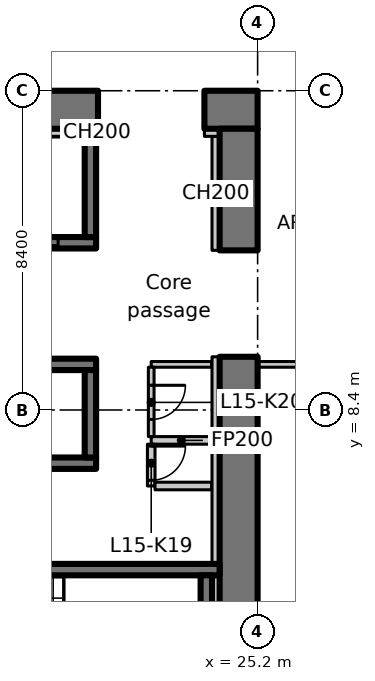
"""IFC4 building model, lengths in metres.
Left out: names, types, materials, properties, quantities, classifications, styles, units other than length and angle.
Written with IfcOpenShell. Run it as: python <this file> out.ifc"""

import sys

from ifc_helpers import new_model, si_unit, direction, frame, frame_2d, origin, place, context, subcontext, project, spatial, rectangle, extrude, element, fill, save


model = new_model("IFC4")
c1 = context("Model", 3, precision=1e-05, world=origin(), true_north=direction((0.0, 1.0)))
c2 = subcontext(c1, "Body", "Model", "MODEL_VIEW")
j1 = project(units=[si_unit("LENGTHUNIT", "METRE"), si_unit("PLANEANGLEUNIT", "RADIAN")], contexts=[c1])
p1 = place(None, origin())
s1 = spatial("IfcSite", under=j1, at=p1, CompositionType="ELEMENT")
p2 = place(p1, origin())
s2 = spatial("IfcBuilding", under=s1, at=p2, CompositionType="ELEMENT")
p3 = place(p2, frame((0.0, 0.0, 68.9)))
s3 = spatial("IfcBuildingStorey", under=s2, at=p3, CompositionType="ELEMENT", Elevation=68.9)
p4 = place(p3, frame((-1.1, 16.3, 0.0), z_axis=(0.0, 0.0, 1.0), x_axis=(1.0, 0.0, 0.0)))
e1 = element("IfcWall", 1, at=p4, inside=s3, PredefinedType="SHEAR", context=c2, shape_type="SweptSolid", body=[
    extrude(rectangle(XDim=22.1, YDim=1.0, at=frame_2d((11.05, 0.0))), origin(), (0.0, 0.0, 1.0), 3.35),
])
p5 = place(p4, frame((3.15, 0.0, 0.0)))
e2 = element("IfcOpeningElement", 2, at=p5, cuts=e1, PredefinedType="OPENING", context=c2, shape_type="SweptSolid", body=[
    extrude(rectangle(XDim=1.1, YDim=2.3, at=frame_2d((0.55, 1.15))), frame((0.0, 0.51, 0.0), z_axis=(0.0, -1.0, 0.0), x_axis=(1.0, 0.0, 0.0)), (0.0, 0.0, 1.0), 1.02),
])
p6 = place(p3, frame((23.8, 16.3, 0.0), z_axis=(0.0, 0.0, 1.0), x_axis=(1.0, 0.0, 0.0)))
e3 = element("IfcWall", 3, at=p6, inside=s3, PredefinedType="SHEAR", context=c2, shape_type="SweptSolid", body=[
    extrude(rectangle(XDim=1.4, YDim=1.0, at=frame_2d((0.7, 0.0))), origin(), (0.0, 0.0, 1.0), 3.35),
])
p7 = place(p3, frame((24.7, 1.0, 0.0), z_axis=(0.0, 0.0, 1.0), x_axis=(0.0, 1.0, 0.0)))
e4 = element("IfcWall", 4, at=p7, inside=s3, PredefinedType="SHEAR", context=c2, shape_type="SweptSolid", body=[
    extrude(rectangle(XDim=8.8, YDim=1.0, at=frame_2d((4.4, 0.0))), origin(), (0.0, 0.0, 1.0), 3.35),
])
p8 = place(p3, frame((24.7, 12.6, 0.0), z_axis=(0.0, 0.0, 1.0), x_axis=(0.0, 1.0, 0.0)))
e5 = element("IfcWall", 5, at=p8, inside=s3, PredefinedType="SHEAR", context=c2, shape_type="SweptSolid", body=[
    extrude(rectangle(XDim=3.2, YDim=1.0, at=frame_2d((1.6, 0.0))), origin(), (0.0, 0.0, 1.0), 3.35),
])
p9 = place(p3, frame((24.1, 12.6, 0.0), z_axis=(0.0, 0.0, 1.0), x_axis=(0.0, 1.0, 0.0)))
e6 = element("IfcWall", 6, at=p9, inside=s3, PredefinedType="PARTITIONING", context=c2, shape_type="SweptSolid", body=[
    extrude(rectangle(XDim=3.0, YDim=0.2, at=frame_2d((1.5, 0.0))), origin(), (0.0, 0.0, 1.0), 3.35),
])
p10 = place(p3, frame((23.8, 15.7, 0.0), z_axis=(0.0, 0.0, 1.0), x_axis=(1.0, 0.0, 0.0)))
e7 = element("IfcWall", 7, at=p10, inside=s3, PredefinedType="PARTITIONING", context=c2, shape_type="SweptSolid", body=[
    extrude(rectangle(XDim=0.4, YDim=0.2, at=frame_2d((0.2, 0.0))), origin(), (0.0, 0.0, 1.0), 3.35),
])
p11 = place(p3, frame((1.0, 7.0, 0.0), z_axis=(0.0, 0.0, 1.0), x_axis=(1.0, 0.0, 0.0)))
e8 = element("IfcWall", 8, at=p11, inside=s3, PredefinedType="SHEAR", context=c2, shape_type="SweptSolid", body=[
    extrude(rectangle(XDim=19.95, YDim=0.3, at=frame_2d((9.975, 0.0))), origin(), (0.0, 0.0, 1.0), 3.35),
])
p12 = place(p3, frame((1.0, 9.6, 0.0), z_axis=(0.0, 0.0, 1.0), x_axis=(1.0, 0.0, 0.0)))
e9 = element("IfcWall", 9, at=p12, inside=s3, PredefinedType="SHEAR", context=c2, shape_type="SweptSolid", body=[
    extrude(rectangle(XDim=19.95, YDim=0.3, at=frame_2d((9.975, 0.0))), origin(), (0.0, 0.0, 1.0), 3.35),
])
p13 = place(p12, frame((1.05, 0.0, 0.0)))
e10 = element("IfcOpeningElement", 10, at=p13, cuts=e9, PredefinedType="OPENING", context=c2, shape_type="SweptSolid", body=[
    extrude(rectangle(XDim=1.1, YDim=2.3, at=frame_2d((0.55, 1.15))), frame((0.0, 0.16, 0.0), z_axis=(0.0, -1.0, 0.0), x_axis=(1.0, 0.0, 0.0)), (0.0, 0.0, 1.0), 0.32),
])
p14 = place(p12, frame((3.85, 0.0, 0.0)))
e11 = element("IfcOpeningElement", 11, at=p14, cuts=e9, PredefinedType="OPENING", context=c2, shape_type="SweptSolid", body=[
    extrude(rectangle(XDim=1.1, YDim=2.3, at=frame_2d((0.55, 1.15))), frame((0.0, 0.16, 0.0), z_axis=(0.0, -1.0, 0.0), x_axis=(1.0, 0.0, 0.0)), (0.0, 0.0, 1.0), 0.32),
])
p15 = place(p12, frame((6.65, 0.0, 0.0)))
e12 = element("IfcOpeningElement", 12, at=p15, cuts=e9, PredefinedType="OPENING", context=c2, shape_type="SweptSolid", body=[
    extrude(rectangle(XDim=1.1, YDim=2.3, at=frame_2d((0.55, 1.15))), frame((0.0, 0.16, 0.0), z_axis=(0.0, -1.0, 0.0), x_axis=(1.0, 0.0, 0.0)), (0.0, 0.0, 1.0), 0.32),
])
p16 = place(p12, frame((9.45, 0.0, 0.0)))
e13 = element("IfcOpeningElement", 13, at=p16, cuts=e9, PredefinedType="OPENING", context=c2, shape_type="SweptSolid", body=[
    extrude(rectangle(XDim=1.1, YDim=2.3, at=frame_2d((0.55, 1.15))), frame((0.0, 0.16, 0.0), z_axis=(0.0, -1.0, 0.0), x_axis=(1.0, 0.0, 0.0)), (0.0, 0.0, 1.0), 0.32),
])
p17 = place(p12, frame((12.25, 0.0, 0.0)))
e14 = element("IfcOpeningElement", 14, at=p17, cuts=e9, PredefinedType="OPENING", context=c2, shape_type="SweptSolid", body=[
    extrude(rectangle(XDim=1.1, YDim=2.3, at=frame_2d((0.55, 1.15))), frame((0.0, 0.16, 0.0), z_axis=(0.0, -1.0, 0.0), x_axis=(1.0, 0.0, 0.0)), (0.0, 0.0, 1.0), 0.32),
])
p18 = place(p12, frame((15.05, 0.0, 0.0)))
e15 = element("IfcOpeningElement", 15, at=p18, cuts=e9, PredefinedType="OPENING", context=c2, shape_type="SweptSolid", body=[
    extrude(rectangle(XDim=1.1, YDim=2.3, at=frame_2d((0.55, 1.15))), frame((0.0, 0.16, 0.0), z_axis=(0.0, -1.0, 0.0), x_axis=(1.0, 0.0, 0.0)), (0.0, 0.0, 1.0), 0.32),
])
p19 = place(p3, frame((20.8, 7.15, 0.0), z_axis=(0.0, 0.0, 1.0), x_axis=(0.0, 1.0, 0.0)))
e16 = element("IfcWall", 16, at=p19, inside=s3, PredefinedType="SHEAR", context=c2, shape_type="SweptSolid", body=[
    extrude(rectangle(XDim=2.3, YDim=0.3, at=frame_2d((1.15, 0.0))), origin(), (0.0, 0.0, 1.0), 3.35),
])
p20 = place(p3, frame((15.05, 12.8, 0.0), z_axis=(0.0, 0.0, 1.0), x_axis=(1.0, 0.0, 0.0)))
e17 = element("IfcWall", 17, at=p20, inside=s3, PredefinedType="SHEAR", context=c2, shape_type="SweptSolid", body=[
    extrude(rectangle(XDim=5.9, YDim=0.3, at=frame_2d((2.95, 0.0))), origin(), (0.0, 0.0, 1.0), 3.35),
])
p21 = place(p20, frame((3.8, 0.0, 0.0)))
e18 = element("IfcOpeningElement", 18, at=p21, cuts=e17, PredefinedType="OPENING", context=c2, shape_type="SweptSolid", body=[
    extrude(rectangle(XDim=1.1, YDim=2.3, at=frame_2d((0.55, 1.15))), frame((0.0, 0.16, 0.0), z_axis=(0.0, -1.0, 0.0), x_axis=(1.0, 0.0, 0.0)), (0.0, 0.0, 1.0), 0.32),
])
p22 = place(p3, frame((20.8, 12.95, 0.0), z_axis=(0.0, 0.0, 1.0), x_axis=(0.0, 1.0, 0.0)))
e19 = element("IfcWall", 19, at=p22, inside=s3, PredefinedType="SHEAR", context=c2, shape_type="SweptSolid", body=[
    extrude(rectangle(XDim=2.85, YDim=0.3, at=frame_2d((1.425, 0.0))), origin(), (0.0, 0.0, 1.0), 3.35),
])
p23 = place(p3, frame((15.8, 4.2, 0.0), z_axis=(0.0, 0.0, 1.0), x_axis=(1.0, 0.0, 0.0)))
e20 = element("IfcWall", 20, at=p23, inside=s3, PredefinedType="SHEAR", context=c2, shape_type="SweptSolid", body=[
    extrude(rectangle(XDim=8.4, YDim=0.3, at=frame_2d((4.2, 0.0))), origin(), (0.0, 0.0, 1.0), 3.35),
])
p24 = place(p23, frame((0.4, 0.0, 0.0)))
e21 = element("IfcOpeningElement", 21, at=p24, cuts=e20, PredefinedType="OPENING", context=c2, shape_type="SweptSolid", body=[
    extrude(rectangle(XDim=1.0, YDim=2.1, at=frame_2d((0.5, 1.05))), frame((0.0, 0.16, 0.0), z_axis=(0.0, -1.0, 0.0), x_axis=(1.0, 0.0, 0.0)), (0.0, 0.0, 1.0), 0.32),
])
p25 = place(p3, frame((23.85, 1.5, 0.0), z_axis=(0.0, 0.0, 1.0), x_axis=(0.0, 1.0, 0.0)))
e22 = element("IfcWall", 22, at=p25, inside=s3, PredefinedType="SHEAR", context=c2, shape_type="SweptSolid", body=[
    extrude(rectangle(XDim=2.55, YDim=0.3, at=frame_2d((1.275, 0.0))), origin(), (0.0, 0.0, 1.0), 3.35),
])
p26 = place(p3, frame((23.988, 7.6, 0.0), z_axis=(0.0, 0.0, 1.0), x_axis=(-1.0, 0.0, 0.0)))
e23 = element("IfcWall", 23, at=p26, inside=s3, PredefinedType="PARTITIONING", context=c2, shape_type="SweptSolid", body=[
    extrude(rectangle(XDim=1.588, YDim=0.2, at=frame_2d((0.794, 0.0))), origin(), (0.0, 0.0, 1.0), 3.35),
])
p27 = place(p3, frame((22.4, 7.5, 0.0), z_axis=(0.0, 0.0, 1.0), x_axis=(0.0, -1.0, 0.0)))
e24 = element("IfcWall", 24, at=p27, inside=s3, PredefinedType="PARTITIONING", context=c2, shape_type="SweptSolid", body=[
    extrude(rectangle(XDim=1.1, YDim=0.2, at=frame_2d((0.55, 0.0))), origin(), (0.0, 0.0, 1.0), 3.35),
])
p28 = place(p27, frame((0.05, 0.0, 0.0)))
e25 = element("IfcOpeningElement", 25, at=p28, cuts=e24, PredefinedType="OPENING", context=c2, shape_type="SweptSolid", body=[
    extrude(rectangle(XDim=0.9, YDim=2.1, at=frame_2d((0.45, 1.05))), frame((0.0, 0.11, 0.0), z_axis=(0.0, -1.0, 0.0), x_axis=(1.0, 0.0, 0.0)), (0.0, 0.0, 1.0), 0.22),
])
p29 = place(p3, frame((22.5, 6.4, 0.0), z_axis=(0.0, 0.0, 1.0), x_axis=(1.0, 0.0, 0.0)))
e26 = element("IfcWall", 26, at=p29, inside=s3, PredefinedType="PARTITIONING", context=c2, shape_type="SweptSolid", body=[
    extrude(rectangle(XDim=1.488, YDim=0.2, at=frame_2d((0.744, 0.0))), origin(), (0.0, 0.0, 1.0), 3.35),
])
p30 = place(p3, frame((23.988, 9.6, 0.0), z_axis=(0.0, 0.0, 1.0), x_axis=(-1.0, 0.0, 0.0)))
e27 = element("IfcWall", 27, at=p30, inside=s3, PredefinedType="PARTITIONING", context=c2, shape_type="SweptSolid", body=[
    extrude(rectangle(XDim=1.588, YDim=0.15, at=frame_2d((0.794, 0.0))), origin(), (0.0, 0.0, 1.0), 3.35),
])
p31 = place(p3, frame((22.4, 9.525, 0.0), z_axis=(0.0, 0.0, 1.0), x_axis=(0.0, -1.0, 0.0)))
e28 = element("IfcWall", 28, at=p31, inside=s3, PredefinedType="PARTITIONING", context=c2, shape_type="SweptSolid", body=[
    extrude(rectangle(XDim=1.825, YDim=0.15, at=frame_2d((0.913, 0.0))), origin(), (0.0, 0.0, 1.0), 3.35),
])
p32 = place(p31, frame((0.475, 0.0, 0.0)))
e29 = element("IfcOpeningElement", 29, at=p32, cuts=e28, PredefinedType="OPENING", context=c2, shape_type="SweptSolid", body=[
    extrude(rectangle(XDim=0.9, YDim=2.1, at=frame_2d((0.45, 1.05))), frame((0.0, 0.085, 0.0), z_axis=(0.0, -1.0, 0.0), x_axis=(1.0, 0.0, 0.0)), (0.0, 0.0, 1.0), 0.17),
])
p33 = place(p3, frame((18.15, 15.7, 0.0), z_axis=(0.0, 0.0, 1.0), x_axis=(1.0, 0.0, 0.0)))
e30 = element("IfcWall", 30, at=p33, inside=s3, PredefinedType="PARTITIONING", context=c2, shape_type="SweptSolid", body=[
    extrude(rectangle(XDim=2.5, YDim=0.2, at=frame_2d((1.25, 0.0))), origin(), (0.0, 0.0, 1.0), 3.35),
])
p34 = place(p3, frame((20.95, 15.7, 0.0), z_axis=(0.0, 0.0, 1.0), x_axis=(1.0, 0.0, 0.0)))
e31 = element("IfcWall", 31, at=p34, inside=s3, PredefinedType="PARTITIONING", context=c2, shape_type="SweptSolid", body=[
    extrude(rectangle(XDim=0.05, YDim=0.2, at=frame_2d((0.025, 0.0))), origin(), (0.0, 0.0, 1.0), 3.35),
])
p35 = place(p3, frame((24.1, 1.5, 0.0), z_axis=(0.0, 0.0, 1.0), x_axis=(0.0, 1.0, 0.0)))
e32 = element("IfcWall", 32, at=p35, inside=s3, PredefinedType="PARTITIONING", context=c2, shape_type="SweptSolid", body=[
    extrude(rectangle(XDim=2.55, YDim=0.2, at=frame_2d((1.275, 0.0))), origin(), (0.0, 0.0, 1.0), 3.35),
])
p36 = place(p3, frame((24.1, 4.35, 0.0), z_axis=(0.0, 0.0, 1.0), x_axis=(0.0, 1.0, 0.0)))
e33 = element("IfcWall", 33, at=p36, inside=s3, PredefinedType="PARTITIONING", context=c2, shape_type="SweptSolid", body=[
    extrude(rectangle(XDim=5.45, YDim=0.2, at=frame_2d((2.725, 0.0))), origin(), (0.0, 0.0, 1.0), 3.35),
])
p37 = place(p3, frame((29.4, 9.6, 0.0), z_axis=(0.0, 0.0, 1.0), x_axis=(-1.0, 0.0, 0.0)))
e34 = element("IfcWall", 34, at=p37, inside=s3, PredefinedType="PARTITIONING", context=c2, shape_type="SweptSolid", body=[
    extrude(rectangle(XDim=4.2, YDim=0.15, at=frame_2d((2.1, 0.0))), origin(), (0.0, 0.0, 1.0), 3.33),
])
p38 = place(p21, origin())
e35 = element("IfcDoor", 35, at=p38, inside=s3, OperationType="SLIDING_TO_LEFT", PredefinedType="DOOR", context=c2, shape_type="SweptSolid", body=[
    extrude(rectangle(XDim=1.1, YDim=2.3, at=frame_2d((0.55, 1.15))), frame((0.0, 0.025, 0.0), z_axis=(0.0, -1.0, 0.0), x_axis=(1.0, 0.0, 0.0)), (0.0, 0.0, 1.0), 0.05),
])
fill(e18, e35)
p39 = place(p28, origin())
e36 = element("IfcDoor", 36, at=p39, inside=s3, OperationType="SINGLE_SWING_LEFT", PredefinedType="DOOR", context=c2, shape_type="SweptSolid", body=[
    extrude(rectangle(XDim=0.9, YDim=2.1, at=frame_2d((0.45, 1.05))), frame((0.0, 0.025, 0.0), z_axis=(0.0, -1.0, 0.0), x_axis=(1.0, 0.0, 0.0)), (0.0, 0.0, 1.0), 0.05),
])
fill(e25, e36)
p40 = place(p32, origin())
e37 = element("IfcDoor", 37, at=p40, inside=s3, OperationType="SINGLE_SWING_RIGHT", PredefinedType="DOOR", context=c2, shape_type="SweptSolid", body=[
    extrude(rectangle(XDim=0.9, YDim=2.1, at=frame_2d((0.45, 1.05))), frame((0.0, 0.025, 0.0), z_axis=(0.0, -1.0, 0.0), x_axis=(1.0, 0.0, 0.0)), (0.0, 0.0, 1.0), 0.05),
])
fill(e29, e37)
save(model, sys.argv[1])
